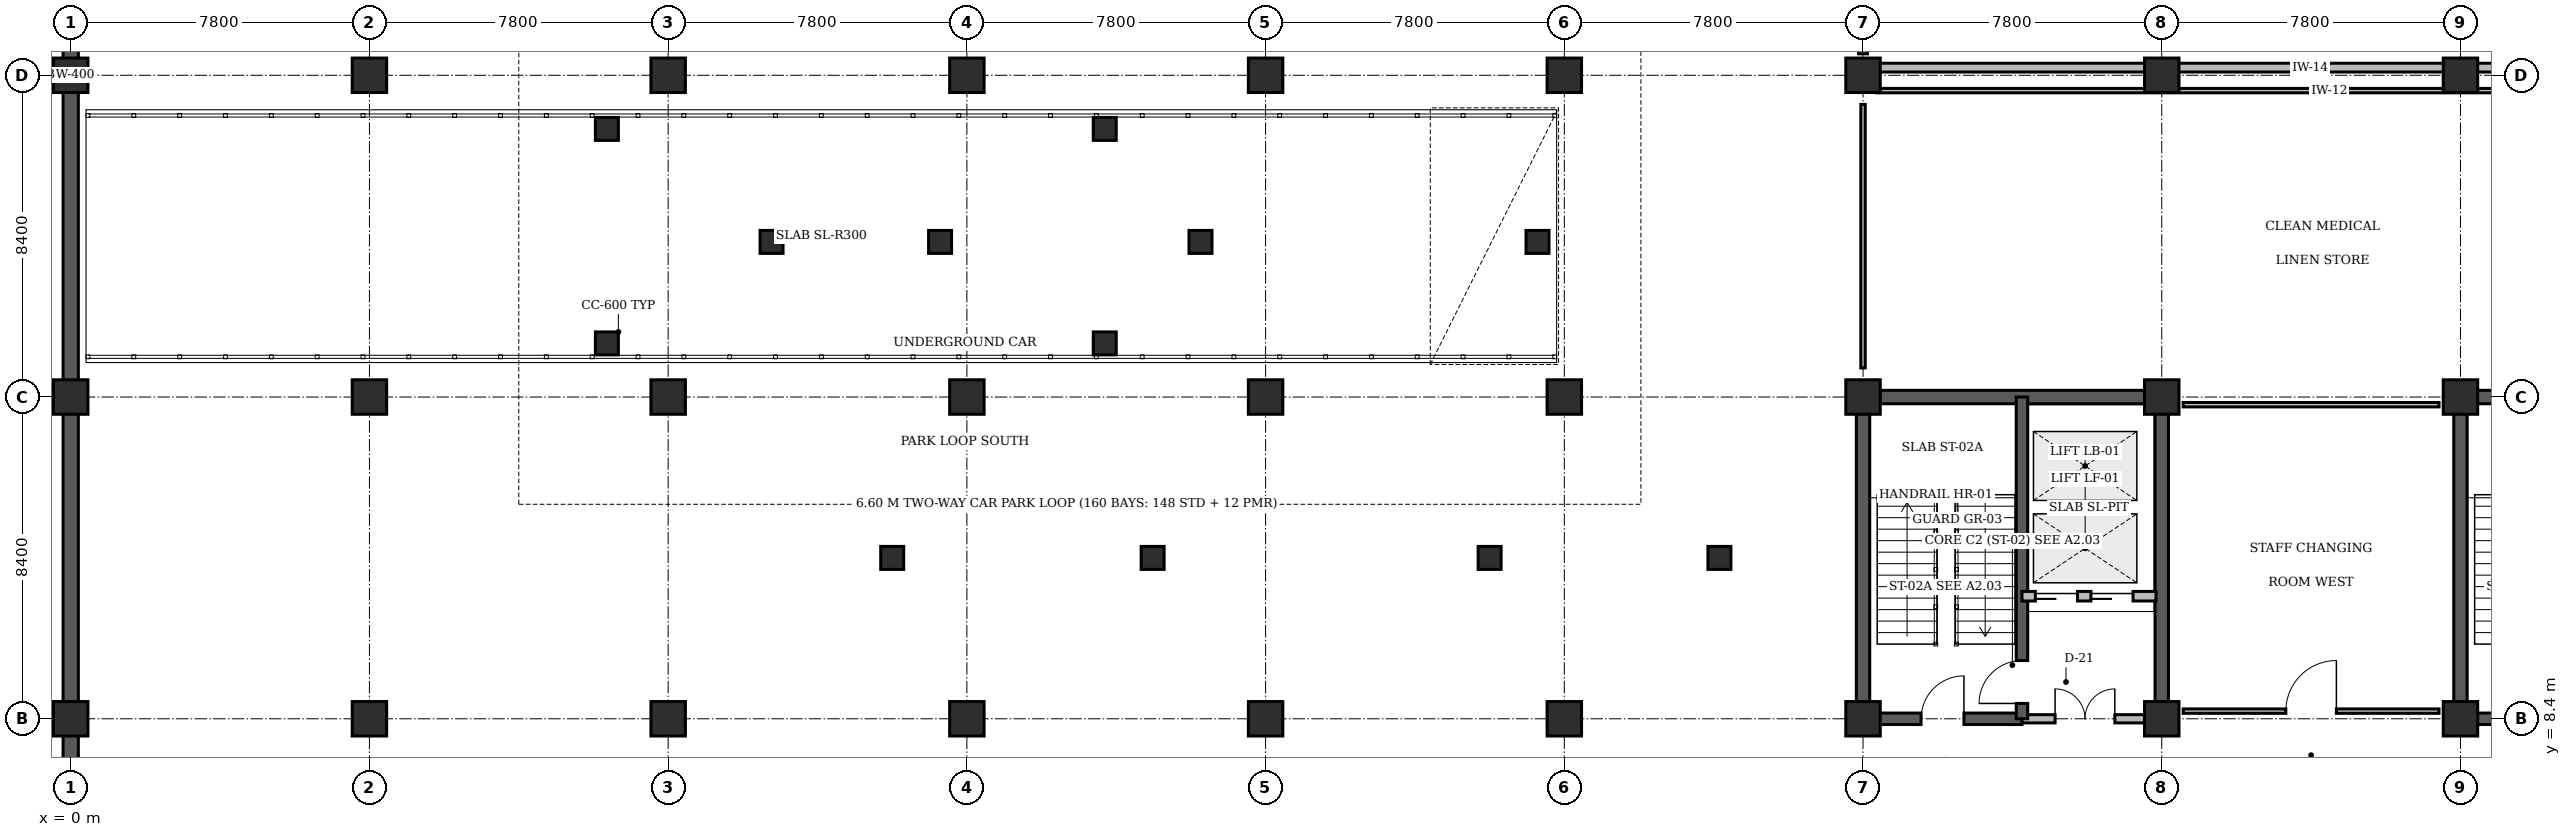
"""IFC4 building model, lengths in metres.
Left out: names, types, materials, properties, quantities, classifications, styles, units other than length and angle.
Written with IfcOpenShell. Run it as: python <this file> out.ifc"""

import sys

from ifc_helpers import new_model, si_unit, direction, frame, frame_2d, origin, origin_2d, place, context, subcontext, project, spatial, rectangle, circle, extrude, element, fill, save


model = new_model("IFC4")
c1 = context("Model", 3, precision=1e-05, world=origin(), true_north=direction((0.0, 1.0)))
c2 = subcontext(c1, "Body", "Model", "MODEL_VIEW")
j1 = project(units=[si_unit("LENGTHUNIT", "METRE"), si_unit("PLANEANGLEUNIT", "RADIAN")], contexts=[c1])
p1 = place(None, origin())
s1 = spatial("IfcSite", under=j1, at=p1, CompositionType="ELEMENT")
p2 = place(p1, origin())
s2 = spatial("IfcBuilding", under=s1, at=p2, CompositionType="ELEMENT")
p3 = place(p2, frame((0.0, 0.0, -4.8)))
s3 = spatial("IfcBuildingStorey", under=s2, at=p3, CompositionType="ELEMENT", Elevation=-4.8)
p4 = place(p3, frame((46.625, 16.8, 0.0), z_axis=(0.0, 0.0, 1.0), x_axis=(1.0, 0.0, 0.0)))
e1 = element("IfcWall", 1, at=p4, inside=s3, PredefinedType="SHEAR", context=c2, shape_type="SweptSolid", body=[
    extrude(rectangle(XDim=8.15, YDim=0.35, at=frame_2d((4.075, 0.0))), origin(), (0.0, 0.0, 1.0), 4.4),
])
for number, where, z_axis, x_axis in (
    (2, (46.8, 8.4, 0.0), (0.0, 0.0, 1.0), (0.0, 1.0, 0.0)),
    (3, (54.6, 8.4, 0.0), (0.0, 0.0, 1.0), (0.0, 1.0, 0.0)),
):
    element("IfcWall", number, at=place(p3, frame(where, z_axis=z_axis, x_axis=x_axis)), inside=s3, PredefinedType="SHEAR", context=c2, shape_type="SweptSolid", body=[
        extrude(rectangle(XDim=8.4, YDim=0.35, at=frame_2d((4.2, 0.0))), origin(), (0.0, 0.0, 1.0), 4.4),
    ])
p5 = place(p3, frame((62.225, 16.8, 0.0), z_axis=(0.0, 0.0, 1.0), x_axis=(1.0, 0.0, 0.0)))
e4 = element("IfcWall", 4, at=p5, inside=s3, PredefinedType="SHEAR", context=c2, shape_type="SweptSolid", body=[
    extrude(rectangle(XDim=8.15, YDim=0.35, at=frame_2d((4.075, 0.0))), origin(), (0.0, 0.0, 1.0), 4.4),
])
p6 = place(p3, frame((62.4, 8.4, 0.0), z_axis=(0.0, 0.0, 1.0), x_axis=(0.0, 1.0, 0.0)))
e5 = element("IfcWall", 5, at=p6, inside=s3, PredefinedType="SHEAR", context=c2, shape_type="SweptSolid", body=[
    extrude(rectangle(XDim=8.4, YDim=0.35, at=frame_2d((4.2, 0.0))), origin(), (0.0, 0.0, 1.0), 4.4),
])
p7 = place(p3, frame((0.0, 50.4, 0.0), z_axis=(0.0, 0.0, 1.0), x_axis=(0.0, -1.0, 0.0)))
e6 = element("IfcWall", 6, at=p7, inside=s3, PredefinedType="SOLIDWALL", context=c2, shape_type="SweptSolid", body=[
    extrude(rectangle(XDim=50.4, YDim=0.4, at=frame_2d((25.2, 0.0))), origin(), (0.0, 0.0, 1.0), 4.8),
])
for number, where, z_axis, x_axis in (
    (7, (0.0, 8.4, 0.0), (0.0, 0.0, 1.0), (1.0, 0.0, 0.0)),
    (8, (0.0, 16.8, 0.0), (0.0, 0.0, 1.0), (1.0, 0.0, 0.0)),
    (9, (0.0, 25.2, 0.0), (0.0, 0.0, 1.0), (1.0, 0.0, 0.0)),
    (10, (7.8, 8.4, 0.0), (0.0, 0.0, 1.0), (1.0, 0.0, 0.0)),
    (11, (7.8, 16.8, 0.0), (0.0, 0.0, 1.0), (1.0, 0.0, 0.0)),
    (12, (7.8, 25.2, 0.0), (0.0, 0.0, 1.0), (1.0, 0.0, 0.0)),
    (13, (15.6, 8.4, 0.0), (0.0, 0.0, 1.0), (1.0, 0.0, 0.0)),
    (14, (15.6, 16.8, 0.0), (0.0, 0.0, 1.0), (1.0, 0.0, 0.0)),
    (15, (15.6, 25.2, 0.0), (0.0, 0.0, 1.0), (1.0, 0.0, 0.0)),
    (16, (23.4, 8.4, 0.0), (0.0, 0.0, 1.0), (1.0, 0.0, 0.0)),
    (17, (23.4, 16.8, 0.0), (0.0, 0.0, 1.0), (1.0, 0.0, 0.0)),
    (18, (23.4, 25.2, 0.0), (0.0, 0.0, 1.0), (1.0, 0.0, 0.0)),
    (19, (31.2, 8.4, 0.0), (0.0, 0.0, 1.0), (1.0, 0.0, 0.0)),
    (20, (31.2, 16.8, 0.0), (0.0, 0.0, 1.0), (1.0, 0.0, 0.0)),
    (21, (31.2, 25.2, 0.0), (0.0, 0.0, 1.0), (1.0, 0.0, 0.0)),
    (22, (39.0, 8.4, 0.0), (0.0, 0.0, 1.0), (1.0, 0.0, 0.0)),
    (23, (39.0, 16.8, 0.0), (0.0, 0.0, 1.0), (1.0, 0.0, 0.0)),
    (24, (39.0, 25.2, 0.0), (0.0, 0.0, 1.0), (1.0, 0.0, 0.0)),
    (25, (46.8, 8.4, 0.0), (0.0, 0.0, 1.0), (1.0, 0.0, 0.0)),
    (26, (46.8, 16.8, 0.0), (0.0, 0.0, 1.0), (1.0, 0.0, 0.0)),
    (27, (46.8, 25.2, 0.0), (0.0, 0.0, 1.0), (1.0, 0.0, 0.0)),
    (28, (54.6, 8.4, 0.0), (0.0, 0.0, 1.0), (1.0, 0.0, 0.0)),
    (29, (54.6, 16.8, 0.0), (0.0, 0.0, 1.0), (1.0, 0.0, 0.0)),
    (30, (54.6, 25.2, 0.0), (0.0, 0.0, 1.0), (1.0, 0.0, 0.0)),
    (31, (62.4, 8.4, 0.0), (0.0, 0.0, 1.0), (1.0, 0.0, 0.0)),
    (32, (62.4, 16.8, 0.0), (0.0, 0.0, 1.0), (1.0, 0.0, 0.0)),
    (33, (62.4, 25.2, 0.0), (0.0, 0.0, 1.0), (1.0, 0.0, 0.0)),
):
    element("IfcColumn", number, at=place(p3, frame(where, z_axis=z_axis, x_axis=x_axis)), inside=s3, PredefinedType="COLUMN", context=c2, shape_type="SweptSolid", body=[
        extrude(rectangle(XDim=0.9, YDim=0.9, at=origin_2d()), origin(), (0.0, 0.0, 1.0), 4.8),
    ])
for number, where, z_axis, x_axis in (
    (34, (14.0, 18.2, 0.0), (0.0, 0.0, 1.0), (1.0, 0.0, 0.0)),
    (35, (14.0, 23.8, 0.0), (0.0, 0.0, 1.0), (1.0, 0.0, 0.0)),
):
    element("IfcColumn", number, at=place(p3, frame(where, z_axis=z_axis, x_axis=x_axis)), inside=s3, PredefinedType="PILASTER", context=c2, shape_type="SweptSolid", body=[
        extrude(circle(Radius=0.3, at=origin_2d()), origin(), (0.0, 0.0, 1.0), 2.95),
    ])
for number, where, z_axis, x_axis in (
    (36, (27.0, 18.2, 0.0), (0.0, 0.0, 1.0), (1.0, 0.0, 0.0)),
    (37, (27.0, 23.8, 0.0), (0.0, 0.0, 1.0), (1.0, 0.0, 0.0)),
):
    element("IfcColumn", number, at=place(p3, frame(where, z_axis=z_axis, x_axis=x_axis)), inside=s3, PredefinedType="PILASTER", context=c2, shape_type="SweptSolid", body=[
        extrude(circle(Radius=0.3, at=origin_2d()), origin(), (0.0, 0.0, 1.0), 1.25),
    ])
for number, where, z_axis, x_axis in (
    (38, (18.3, 20.85, -0.4), (0.0, 0.0, 1.0), (1.0, 0.0, 0.0)),
    (39, (21.45, 12.6, -0.4), (0.0, 0.0, 1.0), (1.0, 0.0, 0.0)),
    (40, (22.7, 20.85, -0.4), (0.0, 0.0, 1.0), (1.0, 0.0, 0.0)),
    (41, (28.25, 12.6, -0.4), (0.0, 0.0, 1.0), (1.0, 0.0, 0.0)),
    (42, (29.5, 20.85, -0.4), (0.0, 0.0, 1.0), (1.0, 0.0, 0.0)),
    (43, (37.05, 12.6, -0.4), (0.0, 0.0, 1.0), (1.0, 0.0, 0.0)),
    (44, (38.3, 20.85, -0.4), (0.0, 0.0, 1.0), (1.0, 0.0, 0.0)),
    (45, (43.05, 12.6, -0.4), (0.0, 0.0, 1.0), (1.0, 0.0, 0.0)),
):
    element("IfcColumn", number, at=place(p3, frame(where, z_axis=z_axis, x_axis=x_axis)), inside=s3, PredefinedType="PILASTER", context=c2, shape_type="SweptSolid", body=[
        extrude(circle(Radius=0.3, at=origin_2d()), origin(), (0.0, 0.0, 1.0), 5.2),
    ])
p8 = place(p3, frame((46.8, 8.4, 0.0), z_axis=(0.0, 0.0, 1.0), x_axis=(1.0, 0.0, 0.0)))
e46 = element("IfcWall", 46, at=p8, inside=s3, PredefinedType="SHEAR", context=c2, shape_type="SweptSolid", body=[
    extrude(rectangle(XDim=4.15, YDim=0.3, at=frame_2d((2.075, 0.0))), origin(), (0.0, 0.0, 1.0), 4.8),
])
p9 = place(p8, frame((1.515, 0.0, 0.0)))
e47 = element("IfcOpeningElement", 47, at=p9, cuts=e46, PredefinedType="OPENING", context=c2, shape_type="SweptSolid", body=[
    extrude(rectangle(XDim=1.12, YDim=2.15, at=frame_2d((0.56, 1.075))), frame((0.0, 0.16, 0.0), z_axis=(0.0, -1.0, 0.0), x_axis=(1.0, 0.0, 0.0)), (0.0, 0.0, 1.0), 0.32),
])
p10 = place(p3, frame((50.95, 8.4, 0.0), z_axis=(0.0, 0.0, 1.0), x_axis=(1.0, 0.0, 0.0)))
e48 = element("IfcWall", 48, at=p10, inside=s3, PredefinedType="STANDARD", context=c2, shape_type="SweptSolid", body=[
    extrude(rectangle(XDim=3.29, YDim=0.215, at=frame_2d((1.645, 0.0))), origin(), (0.0, 0.0, 1.0), 3.53),
])
p11 = place(p10, frame((0.865, 0.0, 0.0)))
e49 = element("IfcOpeningElement", 49, at=p11, cuts=e48, PredefinedType="OPENING", context=c2, shape_type="SweptSolid", body=[
    extrude(rectangle(XDim=1.56, YDim=2.2, at=frame_2d((0.78, 1.1))), frame((0.0, 0.118, 0.0), z_axis=(0.0, -1.0, 0.0), x_axis=(1.0, 0.0, 0.0)), (0.0, 0.0, 1.0), 0.235),
])
p12 = place(p3, frame((50.95, 8.4, 0.0), z_axis=(0.0, 0.0, 1.0), x_axis=(0.0, 1.0, 0.0)))
e50 = element("IfcWall", 50, at=p12, inside=s3, PredefinedType="SHEAR", context=c2, shape_type="SweptSolid", body=[
    extrude(rectangle(XDim=8.4, YDim=0.3, at=frame_2d((4.2, 0.0))), origin(), (0.0, 0.0, 1.0), 4.8),
])
p13 = place(p12, frame((0.4, 0.0, 0.0)))
e51 = element("IfcOpeningElement", 51, at=p13, cuts=e50, PredefinedType="OPENING", context=c2, shape_type="SweptSolid", body=[
    extrude(rectangle(XDim=1.12, YDim=2.15, at=frame_2d((0.56, 1.075))), frame((0.0, 0.16, 0.0), z_axis=(0.0, -1.0, 0.0), x_axis=(1.0, 0.0, 0.0)), (0.0, 0.0, 1.0), 0.32),
])
p14 = place(p3, frame((50.95, 11.6, 0.0), z_axis=(0.0, 0.0, 1.0), x_axis=(1.0, 0.0, 0.0)))
e52 = element("IfcWall", 52, at=p14, inside=s3, PredefinedType="STANDARD", context=c2, shape_type="SweptSolid", body=[
    extrude(rectangle(XDim=3.5, YDim=0.25, at=frame_2d((1.75, 0.0))), origin(), (0.0, 0.0, 1.0), 4.46),
])
p15 = place(p14, frame((0.35, 0.0, 0.0)))
e53 = element("IfcOpeningElement", 53, at=p15, cuts=e52, PredefinedType="OPENING", context=c2, shape_type="SweptSolid", body=[
    extrude(rectangle(XDim=1.1, YDim=2.2, at=frame_2d((0.55, 1.1))), frame((0.0, 0.135, 0.0), z_axis=(0.0, -1.0, 0.0), x_axis=(1.0, 0.0, 0.0)), (0.0, 0.0, 1.0), 0.27),
])
p16 = place(p14, frame((1.8, 0.0, 0.0)))
e54 = element("IfcOpeningElement", 54, at=p16, cuts=e52, PredefinedType="OPENING", context=c2, shape_type="SweptSolid", body=[
    extrude(rectangle(XDim=1.1, YDim=2.2, at=frame_2d((0.55, 1.1))), frame((0.0, 0.135, 0.0), z_axis=(0.0, -1.0, 0.0), x_axis=(1.0, 0.0, 0.0)), (0.0, 0.0, 1.0), 0.27),
])
p17 = place(p3, frame((62.4, 8.4, 0.0), z_axis=(0.0, 0.0, 1.0), x_axis=(1.0, 0.0, 0.0)))
e55 = element("IfcWall", 55, at=p17, inside=s3, PredefinedType="SHEAR", context=c2, shape_type="SweptSolid", body=[
    extrude(rectangle(XDim=4.15, YDim=0.3, at=frame_2d((2.075, 0.0))), origin(), (0.0, 0.0, 1.0), 4.8),
])
p18 = place(p17, frame((1.515, 0.0, 0.0)))
e56 = element("IfcOpeningElement", 56, at=p18, cuts=e55, PredefinedType="OPENING", context=c2, shape_type="SweptSolid", body=[
    extrude(rectangle(XDim=1.12, YDim=2.15, at=frame_2d((0.56, 1.075))), frame((0.0, 0.16, 0.0), z_axis=(0.0, -1.0, 0.0), x_axis=(1.0, 0.0, 0.0)), (0.0, 0.0, 1.0), 0.32),
])
p19 = place(p3, frame((47.16, 24.8, 0.0), z_axis=(0.0, 0.0, 1.0), x_axis=(1.0, 0.0, 0.0)))
e57 = element("IfcWall", 57, at=p19, inside=s3, PredefinedType="PARTITIONING", context=c2, shape_type="SweptSolid", body=[
    extrude(rectangle(XDim=23.64, YDim=0.115, at=frame_2d((11.82, 0.0))), origin(), (0.0, 0.0, 1.0), 3.53),
])
p20 = place(p3, frame((46.8, 17.56, 0.0), z_axis=(0.0, 0.0, 1.0), x_axis=(0.0, 1.0, 0.0)))
e58 = element("IfcWall", 58, at=p20, inside=s3, PredefinedType="PARTITIONING", context=c2, shape_type="SweptSolid", body=[
    extrude(rectangle(XDim=6.88, YDim=0.115, at=frame_2d((3.44, 0.0))), origin(), (0.0, 0.0, 1.0), 3.515),
])
p21 = place(p3, frame((55.16, 8.6, 0.0), z_axis=(0.0, 0.0, 1.0), x_axis=(1.0, 0.0, 0.0)))
e59 = element("IfcWall", 59, at=p21, inside=s3, PredefinedType="PARTITIONING", context=c2, shape_type="SweptSolid", body=[
    extrude(rectangle(XDim=6.68, YDim=0.115, at=frame_2d((3.34, 0.0))), origin(), (0.0, 0.0, 1.0), 3.53),
])
p22 = place(p21, frame((2.68, 0.0, 0.0)))
e60 = element("IfcOpeningElement", 60, at=p22, cuts=e59, PredefinedType="OPENING", context=c2, shape_type="SweptSolid", body=[
    extrude(rectangle(XDim=1.32, YDim=2.15, at=frame_2d((0.66, 1.075))), frame((0.0, 0.067, 0.0), z_axis=(0.0, -1.0, 0.0), x_axis=(1.0, 0.0, 0.0)), (0.0, 0.0, 1.0), 0.135),
])
p23 = place(p3, frame((55.16, 16.6, 0.0), z_axis=(0.0, 0.0, 1.0), x_axis=(1.0, 0.0, 0.0)))
e61 = element("IfcWall", 61, at=p23, inside=s3, PredefinedType="PARTITIONING", context=c2, shape_type="SweptSolid", body=[
    extrude(rectangle(XDim=6.68, YDim=0.115, at=frame_2d((3.34, 0.0))), origin(), (0.0, 0.0, 1.0), 3.53),
])
p24 = place(p3, frame((47.16, 25.4, 0.0), z_axis=(0.0, 0.0, 1.0), x_axis=(1.0, 0.0, 0.0)))
e62 = element("IfcWall", 62, at=p24, inside=s3, PredefinedType="STANDARD", context=c2, shape_type="SweptSolid", body=[
    extrude(rectangle(XDim=22.64, YDim=0.23, at=frame_2d((11.32, 0.0))), origin(), (0.0, 0.0, 1.0), 3.53),
])
p25 = place(p3, frame((46.8, 25.76, 0.0), z_axis=(0.0, 0.0, 1.0), x_axis=(0.0, 1.0, 0.0)))
e63 = element("IfcWall", 63, at=p25, inside=s3, PredefinedType="STANDARD", context=c2, shape_type="SweptSolid", body=[
    extrude(rectangle(XDim=57.64, YDim=0.23, at=frame_2d((28.82, 0.0))), origin(), (0.0, 0.0, 1.0), 3.515),
])
p26 = place(p9, origin())
e64 = element("IfcDoor", 64, at=p26, inside=s3, OperationType="SINGLE_SWING_RIGHT", PredefinedType="DOOR", context=c2, shape_type="SweptSolid", body=[
    extrude(rectangle(XDim=1.12, YDim=2.15, at=frame_2d((0.56, 1.075))), frame((0.0, 0.025, 0.0), z_axis=(0.0, -1.0, 0.0), x_axis=(1.0, 0.0, 0.0)), (0.0, 0.0, 1.0), 0.05),
])
fill(e47, e64)
p27 = place(p11, origin())
e65 = element("IfcDoor", 65, at=p27, inside=s3, OperationType="DOUBLE_DOOR_SINGLE_SWING", PredefinedType="DOOR", context=c2, shape_type="SweptSolid", body=[
    extrude(rectangle(XDim=1.56, YDim=2.2, at=frame_2d((0.78, 1.1))), frame((0.0, 0.025, 0.0), z_axis=(0.0, -1.0, 0.0), x_axis=(1.0, 0.0, 0.0)), (0.0, 0.0, 1.0), 0.05),
])
fill(e49, e65)
p28 = place(p13, origin())
e66 = element("IfcDoor", 66, at=p28, inside=s3, OperationType="SINGLE_SWING_LEFT", PredefinedType="DOOR", context=c2, shape_type="SweptSolid", body=[
    extrude(rectangle(XDim=1.12, YDim=2.15, at=frame_2d((0.56, 1.075))), frame((0.0, 0.025, 0.0), z_axis=(0.0, -1.0, 0.0), x_axis=(1.0, 0.0, 0.0)), (0.0, 0.0, 1.0), 0.05),
])
fill(e51, e66)
p29 = place(p15, origin())
e67 = element("IfcDoor", 67, at=p29, inside=s3, OperationType="SLIDING_TO_LEFT", PredefinedType="DOOR", context=c2, shape_type="SweptSolid", body=[
    extrude(rectangle(XDim=1.1, YDim=2.2, at=frame_2d((0.55, 1.1))), frame((0.0, 0.025, 0.0), z_axis=(0.0, -1.0, 0.0), x_axis=(1.0, 0.0, 0.0)), (0.0, 0.0, 1.0), 0.05),
])
fill(e53, e67)
p30 = place(p16, origin())
e68 = element("IfcDoor", 68, at=p30, inside=s3, OperationType="SLIDING_TO_LEFT", PredefinedType="DOOR", context=c2, shape_type="SweptSolid", body=[
    extrude(rectangle(XDim=1.1, YDim=2.2, at=frame_2d((0.55, 1.1))), frame((0.0, 0.025, 0.0), z_axis=(0.0, -1.0, 0.0), x_axis=(1.0, 0.0, 0.0)), (0.0, 0.0, 1.0), 0.05),
])
fill(e54, e68)
p31 = place(p22, origin())
e69 = element("IfcDoor", 69, at=p31, inside=s3, OperationType="SINGLE_SWING_RIGHT", PredefinedType="DOOR", context=c2, shape_type="SweptSolid", body=[
    extrude(rectangle(XDim=1.32, YDim=2.15, at=frame_2d((0.66, 1.075))), frame((0.0, 0.025, 0.0), z_axis=(0.0, -1.0, 0.0), x_axis=(1.0, 0.0, 0.0)), (0.0, 0.0, 1.0), 0.05),
])
fill(e60, e69)
save(model, sys.argv[1])
